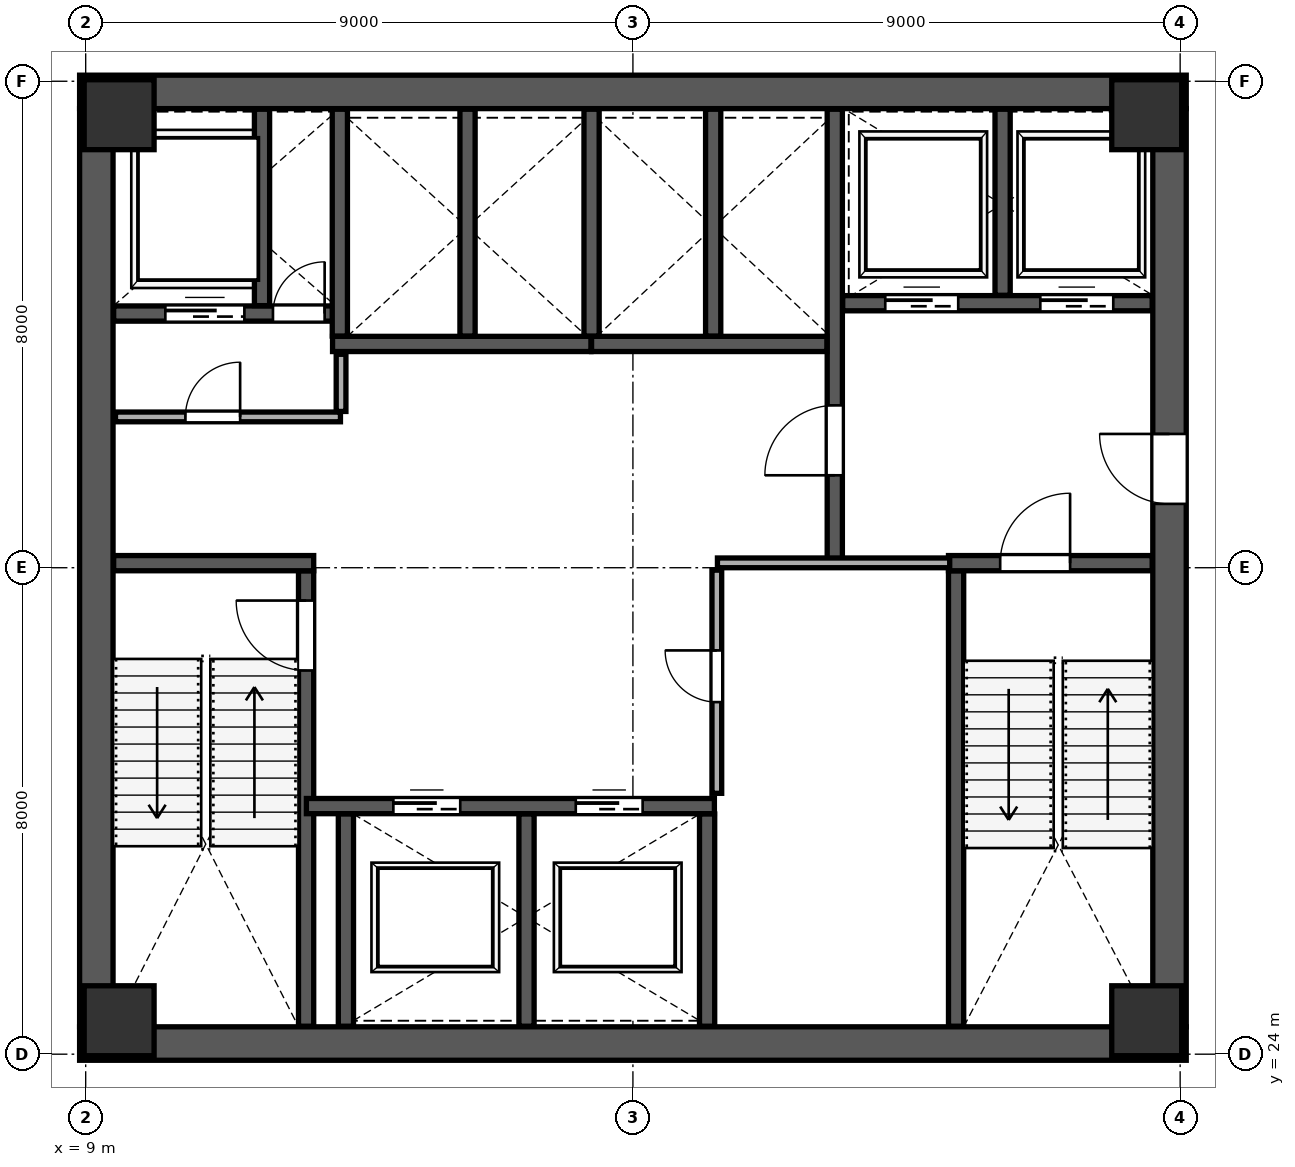
"""IFC4 building model, lengths in metres.
Left out: names, types, materials, properties, quantities, classifications, styles, units other than length and angle.
Written with IfcOpenShell. Run it as: python <this file> out.ifc"""

import sys

from ifc_helpers import new_model, si_unit, direction, frame, frame_2d, origin, origin_2d, place, context, subcontext, project, spatial, rectangle, extrude, source, transform, mapped, element, fill, save


model = new_model("IFC4")
c1 = context("Model", 3, precision=1e-05, world=origin(), true_north=direction((0.0, 1.0)))
c2 = subcontext(c1, "Body", "Model", "MODEL_VIEW")
j1 = project(units=[si_unit("LENGTHUNIT", "METRE"), si_unit("PLANEANGLEUNIT", "RADIAN")], contexts=[c1])
p1 = place(None, origin())
s1 = spatial("IfcSite", under=j1, at=p1, CompositionType="ELEMENT")
p2 = place(p1, origin())
s2 = spatial("IfcBuilding", under=s1, at=p2, CompositionType="ELEMENT")
p3 = place(p2, frame((0.0, 0.0, 91.6)))
s3 = spatial("IfcBuildingStorey", under=s2, at=p3, CompositionType="ELEMENT", Elevation=91.6)
m1 = source(origin(), c2, "Body", "SweptSolid", [
    extrude(rectangle(XDim=1.15, YDim=1.15, at=origin_2d()), origin(), (0.0, 0.0, 1.0), 4.198),
])
for number, where, z_axis, x_axis in (
    (1, (9.55, 24.55, 0.001), (0.0, 0.0, 1.0), (1.0, 0.0, 0.0)),
    (2, (26.45, 24.55, 0.001), (0.0, 0.0, 1.0), (1.0, 0.0, 0.0)),
    (3, (9.55, 39.45, 0.001), (0.0, 0.0, 1.0), (1.0, 0.0, 0.0)),
    (4, (26.45, 39.45, 0.001), (0.0, 0.0, 1.0), (1.0, 0.0, 0.0)),
):
    element("IfcColumn", number, at=place(p3, frame(where, z_axis=z_axis, x_axis=x_axis)), inside=s3, PredefinedType="COLUMN", context=c2, shape_type="MappedRepresentation", body=[
        mapped(m1, transform((0.0, 0.0, 0.0), scale=1.0)),
    ])
p4 = place(p3, frame((9.175, 24.45, 0.0), z_axis=(0.0, 0.0, 1.0), x_axis=(0.0, 1.0, 0.0)))
e5 = element("IfcWall", 5, at=p4, inside=s3, PredefinedType="SHEAR", context=c2, shape_type="SweptSolid", body=[
    extrude(rectangle(XDim=15.1, YDim=0.55, at=frame_2d((7.55, 0.0))), origin(), (0.0, 0.0, 1.0), 3.96),
])
p5 = place(p3, frame((26.825, 24.45, 0.0), z_axis=(0.0, 0.0, 1.0), x_axis=(0.0, 1.0, 0.0)))
e6 = element("IfcWall", 6, at=p5, inside=s3, PredefinedType="SHEAR", context=c2, shape_type="SweptSolid", body=[
    extrude(rectangle(XDim=15.1, YDim=0.55, at=frame_2d((7.55, 0.0))), origin(), (0.0, 0.0, 1.0), 3.96),
])
p6 = place(p5, frame((8.6, 0.0, 0.0)))
e7 = element("IfcOpeningElement", 7, at=p6, cuts=e6, PredefinedType="OPENING", context=c2, shape_type="SweptSolid", body=[
    extrude(rectangle(XDim=1.15, YDim=2.2, at=frame_2d((0.575, 1.1))), frame((0.0, 0.285, 0.0), z_axis=(0.0, -1.0, 0.0), x_axis=(1.0, 0.0, 0.0)), (0.0, 0.0, 1.0), 0.57),
])
for number, where, z_axis, x_axis in (
    (8, (8.9, 24.175, 0.0), (0.0, 0.0, 1.0), (1.0, 0.0, 0.0)),
    (9, (8.9, 39.825, 0.0), (0.0, 0.0, 1.0), (1.0, 0.0, 0.0)),
):
    element("IfcWall", number, at=place(p3, frame(where, z_axis=z_axis, x_axis=x_axis)), inside=s3, PredefinedType="SHEAR", context=c2, shape_type="SweptSolid", body=[
        extrude(rectangle(XDim=18.2, YDim=0.55, at=frame_2d((9.1, 0.0))), origin(), (0.0, 0.0, 1.0), 3.96),
    ])
p7 = place(p3, frame((12.625, 24.46, 0.0), z_axis=(0.0, 0.0, 1.0), x_axis=(0.0, 1.0, 0.0)))
e10 = element("IfcWall", 10, at=p7, inside=s3, PredefinedType="SHEAR", context=c2, shape_type="SweptSolid", body=[
    extrude(rectangle(XDim=7.49, YDim=0.25, at=frame_2d((3.745, 0.0))), origin(), (0.0, 0.0, 1.0), 3.96),
])
p8 = place(p7, frame((5.85, 0.0, 0.0)))
e11 = element("IfcOpeningElement", 11, at=p8, cuts=e10, PredefinedType="OPENING", context=c2, shape_type="SweptSolid", body=[
    extrude(rectangle(XDim=1.15, YDim=2.2, at=frame_2d((0.575, 1.1))), frame((0.0, 0.135, 0.0), z_axis=(0.0, -1.0, 0.0), x_axis=(1.0, 0.0, 0.0)), (0.0, 0.0, 1.0), 0.27),
])
p9 = place(p3, frame((9.46, 32.075, 0.0), z_axis=(0.0, 0.0, 1.0), x_axis=(1.0, 0.0, 0.0)))
e12 = element("IfcWall", 12, at=p9, inside=s3, PredefinedType="SHEAR", context=c2, shape_type="SweptSolid", body=[
    extrude(rectangle(XDim=3.29, YDim=0.25, at=frame_2d((1.645, 0.0))), origin(), (0.0, 0.0, 1.0), 3.96),
])
p10 = place(p3, frame((23.315, 24.46, 0.0), z_axis=(0.0, 0.0, 1.0), x_axis=(0.0, 1.0, 0.0)))
e13 = element("IfcWall", 13, at=p10, inside=s3, PredefinedType="SHEAR", context=c2, shape_type="SweptSolid", body=[
    extrude(rectangle(XDim=7.49, YDim=0.25, at=frame_2d((3.745, 0.0))), origin(), (0.0, 0.0, 1.0), 3.96),
])
p11 = place(p3, frame((23.19, 32.075, 0.0), z_axis=(0.0, 0.0, 1.0), x_axis=(1.0, 0.0, 0.0)))
e14 = element("IfcWall", 14, at=p11, inside=s3, PredefinedType="SHEAR", context=c2, shape_type="SweptSolid", body=[
    extrude(rectangle(XDim=3.35, YDim=0.25, at=frame_2d((1.675, 0.0))), origin(), (0.0, 0.0, 1.0), 3.96),
])
p12 = place(p11, frame((0.85, 0.0, 0.0)))
e15 = element("IfcOpeningElement", 15, at=p12, cuts=e14, PredefinedType="OPENING", context=c2, shape_type="SweptSolid", body=[
    extrude(rectangle(XDim=1.15, YDim=2.2, at=frame_2d((0.575, 1.1))), frame((0.0, 0.135, 0.0), z_axis=(0.0, -1.0, 0.0), x_axis=(1.0, 0.0, 0.0)), (0.0, 0.0, 1.0), 0.27),
])
p13 = place(p3, frame((21.32, 32.12, 0.0), z_axis=(0.0, 0.0, 1.0), x_axis=(0.0, 1.0, 0.0)))
e16 = element("IfcWall", 16, at=p13, inside=s3, PredefinedType="SHEAR", context=c2, shape_type="SweptSolid", body=[
    extrude(rectangle(XDim=7.42, YDim=0.25, at=frame_2d((3.71, 0.0))), origin(), (0.0, 0.0, 1.0), 3.96),
])
p14 = place(p13, frame((1.4, 0.0, 0.0)))
e17 = element("IfcOpeningElement", 17, at=p14, cuts=e16, PredefinedType="OPENING", context=c2, shape_type="SweptSolid", body=[
    extrude(rectangle(XDim=1.15, YDim=2.2, at=frame_2d((0.575, 1.1))), frame((0.0, 0.135, 0.0), z_axis=(0.0, -1.0, 0.0), x_axis=(1.0, 0.0, 0.0)), (0.0, 0.0, 1.0), 0.27),
])
p15 = place(p3, frame((9.46, 36.18, 0.0), z_axis=(0.0, 0.0, 1.0), x_axis=(1.0, 0.0, 0.0)))
e18 = element("IfcWall", 18, at=p15, inside=s3, PredefinedType="SHEAR", context=c2, shape_type="SweptSolid", body=[
    extrude(rectangle(XDim=3.79, YDim=0.25, at=frame_2d((1.895, 0.0))), origin(), (0.0, 0.0, 1.0), 3.96),
])
p16 = place(p15, frame((2.62, 0.0, 0.0)))
e19 = element("IfcOpeningElement", 19, at=p16, cuts=e18, PredefinedType="OPENING", context=c2, shape_type="SweptSolid", body=[
    extrude(rectangle(XDim=0.85, YDim=2.1, at=frame_2d((0.425, 1.05))), frame((0.0, 0.135, 0.0), z_axis=(0.0, -1.0, 0.0), x_axis=(1.0, 0.0, 0.0)), (0.0, 0.0, 1.0), 0.27),
])
p17 = place(p15, frame((0.85, 0.0, 0.0)))
e20 = element("IfcOpeningElement", 20, at=p17, cuts=e18, PredefinedType="OPENING", context=c2, shape_type="SweptSolid", body=[
    extrude(rectangle(XDim=1.3, YDim=2.25, at=frame_2d((0.65, 1.125))), frame((0.0, 0.135, 0.0), z_axis=(0.0, -1.0, 0.0), x_axis=(1.0, 0.0, 0.0)), (0.0, 0.0, 1.0), 0.27),
])
p18 = place(p3, frame((11.9, 36.31, 0.0), z_axis=(0.0, 0.0, 1.0), x_axis=(0.0, 1.0, 0.0)))
e21 = element("IfcWall", 21, at=p18, inside=s3, PredefinedType="SHEAR", context=c2, shape_type="SweptSolid", body=[
    extrude(rectangle(XDim=3.23, YDim=0.25, at=frame_2d((1.615, 0.0))), origin(), (0.0, 0.0, 1.0), 3.96),
])
p19 = place(p3, frame((21.45, 36.35, 0.0), z_axis=(0.0, 0.0, 1.0), x_axis=(1.0, 0.0, 0.0)))
e22 = element("IfcWall", 22, at=p19, inside=s3, PredefinedType="SHEAR", context=c2, shape_type="SweptSolid", body=[
    extrude(rectangle(XDim=5.09, YDim=0.25, at=frame_2d((2.545, 0.0))), origin(), (0.0, 0.0, 1.0), 3.96),
])
p20 = place(p19, frame((0.7, 0.0, 0.0)))
e23 = element("IfcOpeningElement", 23, at=p20, cuts=e22, PredefinedType="OPENING", context=c2, shape_type="SweptSolid", body=[
    extrude(rectangle(XDim=1.2, YDim=2.2, at=frame_2d((0.6, 1.1))), frame((0.0, 0.135, 0.0), z_axis=(0.0, -1.0, 0.0), x_axis=(1.0, 0.0, 0.0)), (0.0, 0.0, 1.0), 0.27),
])
p21 = place(p19, frame((3.25, 0.0, 0.0)))
e24 = element("IfcOpeningElement", 24, at=p21, cuts=e22, PredefinedType="OPENING", context=c2, shape_type="SweptSolid", body=[
    extrude(rectangle(XDim=1.2, YDim=2.2, at=frame_2d((0.6, 1.1))), frame((0.0, 0.135, 0.0), z_axis=(0.0, -1.0, 0.0), x_axis=(1.0, 0.0, 0.0)), (0.0, 0.0, 1.0), 0.27),
])
p22 = place(p3, frame((24.08, 36.48, 0.0), z_axis=(0.0, 0.0, 1.0), x_axis=(0.0, 1.0, 0.0)))
e25 = element("IfcWall", 25, at=p22, inside=s3, PredefinedType="SHEAR", context=c2, shape_type="SweptSolid", body=[
    extrude(rectangle(XDim=3.06, YDim=0.25, at=frame_2d((1.53, 0.0))), origin(), (0.0, 0.0, 1.0), 3.96),
])
p23 = place(p3, frame((12.63, 28.08, 0.0), z_axis=(0.0, 0.0, 1.0), x_axis=(1.0, 0.0, 0.0)))
e26 = element("IfcWall", 26, at=p23, inside=s3, PredefinedType="SHEAR", context=c2, shape_type="SweptSolid", body=[
    extrude(rectangle(XDim=6.71, YDim=0.25, at=frame_2d((3.355, 0.0))), origin(), (0.0, 0.0, 1.0), 3.96),
])
p24 = place(p23, frame((1.43, 0.0, 0.0)))
e27 = element("IfcOpeningElement", 27, at=p24, cuts=e26, PredefinedType="OPENING", context=c2, shape_type="SweptSolid", body=[
    extrude(rectangle(XDim=1.1, YDim=2.2, at=frame_2d((0.55, 1.1))), frame((0.0, 0.135, 0.0), z_axis=(0.0, -1.0, 0.0), x_axis=(1.0, 0.0, 0.0)), (0.0, 0.0, 1.0), 0.27),
])
p25 = place(p23, frame((4.43, 0.0, 0.0)))
e28 = element("IfcOpeningElement", 28, at=p25, cuts=e26, PredefinedType="OPENING", context=c2, shape_type="SweptSolid", body=[
    extrude(rectangle(XDim=1.1, YDim=2.2, at=frame_2d((0.55, 1.1))), frame((0.0, 0.135, 0.0), z_axis=(0.0, -1.0, 0.0), x_axis=(1.0, 0.0, 0.0)), (0.0, 0.0, 1.0), 0.27),
])
for number, where, z_axis, x_axis in (
    (29, (13.28, 24.46, 0.0), (0.0, 0.0, 1.0), (0.0, 1.0, 0.0)),
    (30, (16.25, 24.46, 0.0), (0.0, 0.0, 1.0), (0.0, 1.0, 0.0)),
    (31, (19.22, 24.46, 0.0), (0.0, 0.0, 1.0), (0.0, 1.0, 0.0)),
):
    element("IfcWall", number, at=place(p3, frame(where, z_axis=z_axis, x_axis=x_axis)), inside=s3, PredefinedType="SHEAR", context=c2, shape_type="SweptSolid", body=[
        extrude(rectangle(XDim=3.49, YDim=0.25, at=frame_2d((1.745, 0.0))), origin(), (0.0, 0.0, 1.0), 3.96),
    ])
p26 = place(p3, frame((13.06, 35.68, 0.0), z_axis=(0.0, 0.0, 1.0), x_axis=(1.0, 0.0, 0.0)))
e32 = element("IfcWall", 32, at=p26, inside=s3, PredefinedType="SHEAR", context=c2, shape_type="SweptSolid", body=[
    extrude(rectangle(XDim=4.25, YDim=0.25, at=frame_2d((2.125, 0.0))), origin(), (0.0, 0.0, 1.0), 3.96),
])
for number, where, z_axis, x_axis in (
    (33, (13.18, 35.81, 0.0), (0.0, 0.0, 1.0), (0.0, 1.0, 0.0)),
    (34, (15.28, 35.81, 0.0), (0.0, 0.0, 1.0), (0.0, 1.0, 0.0)),
):
    element("IfcWall", number, at=place(p3, frame(where, z_axis=z_axis, x_axis=x_axis)), inside=s3, PredefinedType="SHEAR", context=c2, shape_type="SweptSolid", body=[
        extrude(rectangle(XDim=3.73, YDim=0.25, at=frame_2d((1.865, 0.0))), origin(), (0.0, 0.0, 1.0), 3.96),
    ])
p27 = place(p3, frame((17.32, 35.68, 0.0), z_axis=(0.0, 0.0, 1.0), x_axis=(1.0, 0.0, 0.0)))
e35 = element("IfcWall", 35, at=p27, inside=s3, PredefinedType="SHEAR", context=c2, shape_type="SweptSolid", body=[
    extrude(rectangle(XDim=3.87, YDim=0.25, at=frame_2d((1.935, 0.0))), origin(), (0.0, 0.0, 1.0), 3.96),
])
for number, where, z_axis, x_axis in (
    (36, (17.32, 35.81, 0.0), (0.0, 0.0, 1.0), (0.0, 1.0, 0.0)),
    (37, (19.32, 35.81, 0.0), (0.0, 0.0, 1.0), (0.0, 1.0, 0.0)),
):
    element("IfcWall", number, at=place(p3, frame(where, z_axis=z_axis, x_axis=x_axis)), inside=s3, PredefinedType="SHEAR", context=c2, shape_type="SweptSolid", body=[
        extrude(rectangle(XDim=3.73, YDim=0.25, at=frame_2d((1.865, 0.0))), origin(), (0.0, 0.0, 1.0), 3.96),
    ])
p28 = place(p3, frame((9.49, 34.48, 0.0), z_axis=(0.0, 0.0, 1.0), x_axis=(1.0, 0.0, 0.0)))
e38 = element("IfcWall", 38, at=p28, inside=s3, PredefinedType="PARTITIONING", context=c2, shape_type="SweptSolid", body=[
    extrude(rectangle(XDim=3.7, YDim=0.16, at=frame_2d((1.85, 0.0))), origin(), (0.0, 0.0, 1.0), 3.96),
])
p29 = place(p28, frame((1.15, 0.0, 0.0)))
e39 = element("IfcOpeningElement", 39, at=p29, cuts=e38, PredefinedType="OPENING", context=c2, shape_type="SweptSolid", body=[
    extrude(rectangle(XDim=0.9, YDim=2.15, at=frame_2d((0.45, 1.075))), frame((0.0, 0.09, 0.0), z_axis=(0.0, -1.0, 0.0), x_axis=(1.0, 0.0, 0.0)), (0.0, 0.0, 1.0), 0.18),
])
p30 = place(p3, frame((13.2, 34.57, 0.0), z_axis=(0.0, 0.0, 1.0), x_axis=(0.0, 1.0, 0.0)))
e40 = element("IfcWall", 40, at=p30, inside=s3, PredefinedType="PARTITIONING", context=c2, shape_type="SweptSolid", body=[
    extrude(rectangle(XDim=0.94, YDim=0.16, at=frame_2d((0.47, 0.0))), origin(), (0.0, 0.0, 1.0), 3.96),
])
p31 = place(p3, frame((19.39, 32.08, 0.0), z_axis=(0.0, 0.0, 1.0), x_axis=(1.0, 0.0, 0.0)))
e41 = element("IfcWall", 41, at=p31, inside=s3, PredefinedType="PARTITIONING", context=c2, shape_type="SweptSolid", body=[
    extrude(rectangle(XDim=3.82, YDim=0.16, at=frame_2d((1.91, 0.0))), origin(), (0.0, 0.0, 1.0), 3.96),
])
p32 = place(p3, frame((19.38, 28.29, 0.0), z_axis=(0.0, 0.0, 1.0), x_axis=(0.0, 1.0, 0.0)))
e42 = element("IfcWall", 42, at=p32, inside=s3, PredefinedType="PARTITIONING", context=c2, shape_type="SweptSolid", body=[
    extrude(rectangle(XDim=3.67, YDim=0.16, at=frame_2d((1.835, 0.0))), origin(), (0.0, 0.0, 1.0), 3.96),
])
p33 = place(p32, frame((1.5, 0.0, 0.0)))
e43 = element("IfcOpeningElement", 43, at=p33, cuts=e42, PredefinedType="OPENING", context=c2, shape_type="SweptSolid", body=[
    extrude(rectangle(XDim=0.85, YDim=2.1, at=frame_2d((0.425, 1.05))), frame((0.0, 0.09, 0.0), z_axis=(0.0, -1.0, 0.0), x_axis=(1.0, 0.0, 0.0)), (0.0, 0.0, 1.0), 0.18),
])
p34 = place(p3, frame((26.504, 12.433, 0.0), z_axis=(0.0, 0.0, 1.0), x_axis=(0.216434476574, 0.976297146032, 0.0)))
e44 = element("IfcWall", 44, at=p34, inside=s3, PredefinedType="PARTITIONING", context=c2, shape_type="SweptSolid", body=[
    extrude(rectangle(XDim=20.38, YDim=0.16, at=frame_2d((10.19, 0.0))), origin(), (0.0, 0.0, 1.0), 3.96),
])
m2 = source(origin(), c2, "Body", "SweptSolid", [
    extrude(rectangle(XDim=1.15, YDim=2.2, at=frame_2d((0.575, 1.1))), frame((0.0, 0.025, 0.0), z_axis=(0.0, -1.0, 0.0), x_axis=(1.0, 0.0, 0.0)), (0.0, 0.0, 1.0), 0.05),
])
p35 = place(p8, origin())
e45 = element("IfcDoor", 45, at=p35, inside=s3, OperationType="SINGLE_SWING_RIGHT", PredefinedType="DOOR", context=c2, shape_type="MappedRepresentation", body=[
    mapped(m2, transform((0.0, 0.0, 0.0), scale=1.0)),
])
fill(e11, e45)
m3 = source(origin(), c2, "Body", "SweptSolid", [
    extrude(rectangle(XDim=1.15, YDim=2.2, at=frame_2d((0.575, 1.1))), frame((0.0, 0.025, 0.0), z_axis=(0.0, -1.0, 0.0), x_axis=(1.0, 0.0, 0.0)), (0.0, 0.0, 1.0), 0.05),
])
p36 = place(p14, origin())
e46 = element("IfcDoor", 46, at=p36, inside=s3, OperationType="SINGLE_SWING_LEFT", PredefinedType="DOOR", context=c2, shape_type="MappedRepresentation", body=[
    mapped(m3, transform((0.0, 0.0, 0.0), scale=1.0)),
])
fill(e17, e46)
p37 = place(p12, origin())
e47 = element("IfcDoor", 47, at=p37, inside=s3, OperationType="SINGLE_SWING_RIGHT", PredefinedType="DOOR", context=c2, shape_type="MappedRepresentation", body=[
    mapped(m2, transform((0.0, 0.0, 0.0), scale=1.0)),
])
fill(e15, e47)
p38 = place(p6, origin())
e48 = element("IfcDoor", 48, at=p38, inside=s3, OperationType="SINGLE_SWING_RIGHT", PredefinedType="DOOR", context=c2, shape_type="MappedRepresentation", body=[
    mapped(m3, transform((0.0, 0.0, 0.0), scale=1.0)),
])
fill(e7, e48)
m4 = source(origin(), c2, "Body", "SweptSolid", [
    extrude(rectangle(XDim=0.85, YDim=2.1, at=frame_2d((0.425, 1.05))), frame((0.0, 0.025, 0.0), z_axis=(0.0, -1.0, 0.0), x_axis=(1.0, 0.0, 0.0)), (0.0, 0.0, 1.0), 0.05),
])
p39 = place(p16, origin())
e49 = element("IfcDoor", 49, at=p39, inside=s3, OperationType="SINGLE_SWING_RIGHT", PredefinedType="DOOR", context=c2, shape_type="MappedRepresentation", body=[
    mapped(m4, transform((0.0, 0.0, 0.0), scale=1.0)),
])
fill(e19, e49)
m5 = source(origin(), c2, "Body", "SweptSolid", [
    extrude(rectangle(XDim=1.1, YDim=2.2, at=frame_2d((0.55, 1.1))), frame((0.0, 0.025, 0.0), z_axis=(0.0, -1.0, 0.0), x_axis=(1.0, 0.0, 0.0)), (0.0, 0.0, 1.0), 0.05),
])
p40 = place(p24, origin())
e50 = element("IfcDoor", 50, at=p40, inside=s3, OperationType="SLIDING_TO_LEFT", PredefinedType="DOOR", context=c2, shape_type="MappedRepresentation", body=[
    mapped(m5, transform((0.0, 0.0, 0.0), scale=1.0)),
])
fill(e27, e50)
p41 = place(p25, origin())
e51 = element("IfcDoor", 51, at=p41, inside=s3, OperationType="SLIDING_TO_RIGHT", PredefinedType="DOOR", context=c2, shape_type="MappedRepresentation", body=[
    mapped(m5, transform((0.0, 0.0, 0.0), scale=1.0)),
])
fill(e28, e51)
m6 = source(origin(), c2, "Body", "SweptSolid", [
    extrude(rectangle(XDim=1.2, YDim=2.2, at=frame_2d((0.6, 1.1))), frame((0.0, 0.025, 0.0), z_axis=(0.0, -1.0, 0.0), x_axis=(1.0, 0.0, 0.0)), (0.0, 0.0, 1.0), 0.05),
])
p42 = place(p20, origin())
e52 = element("IfcDoor", 52, at=p42, inside=s3, OperationType="SLIDING_TO_LEFT", PredefinedType="DOOR", context=c2, shape_type="MappedRepresentation", body=[
    mapped(m6, transform((0.0, 0.0, 0.0), scale=1.0)),
])
fill(e23, e52)
p43 = place(p21, origin())
e53 = element("IfcDoor", 53, at=p43, inside=s3, OperationType="SLIDING_TO_RIGHT", PredefinedType="DOOR", context=c2, shape_type="MappedRepresentation", body=[
    mapped(m6, transform((0.0, 0.0, 0.0), scale=1.0)),
])
fill(e24, e53)
m7 = source(origin(), c2, "Body", "SweptSolid", [
    extrude(rectangle(XDim=1.3, YDim=2.25, at=frame_2d((0.65, 1.125))), frame((0.0, 0.025, 0.0), z_axis=(0.0, -1.0, 0.0), x_axis=(1.0, 0.0, 0.0)), (0.0, 0.0, 1.0), 0.05),
])
p44 = place(p17, origin())
e54 = element("IfcDoor", 54, at=p44, inside=s3, OperationType="SLIDING_TO_LEFT", PredefinedType="DOOR", context=c2, shape_type="MappedRepresentation", body=[
    mapped(m7, transform((0.0, 0.0, 0.0), scale=1.0)),
])
fill(e20, e54)
m8 = source(origin(), c2, "Body", "SweptSolid", [
    extrude(rectangle(XDim=0.9, YDim=2.15, at=frame_2d((0.45, 1.075))), frame((0.0, 0.025, 0.0), z_axis=(0.0, -1.0, 0.0), x_axis=(1.0, 0.0, 0.0)), (0.0, 0.0, 1.0), 0.05),
])
p45 = place(p29, origin())
e55 = element("IfcDoor", 55, at=p45, inside=s3, OperationType="SINGLE_SWING_RIGHT", PredefinedType="DOOR", context=c2, shape_type="MappedRepresentation", body=[
    mapped(m8, transform((0.0, 0.0, 0.0), scale=1.0)),
])
fill(e39, e55)
p46 = place(p33, origin())
e56 = element("IfcDoor", 56, at=p46, inside=s3, OperationType="SINGLE_SWING_RIGHT", PredefinedType="DOOR", context=c2, shape_type="MappedRepresentation", body=[
    mapped(m4, transform((0.0, 0.0, 0.0), scale=1.0)),
])
fill(e43, e56)
save(model, sys.argv[1])
